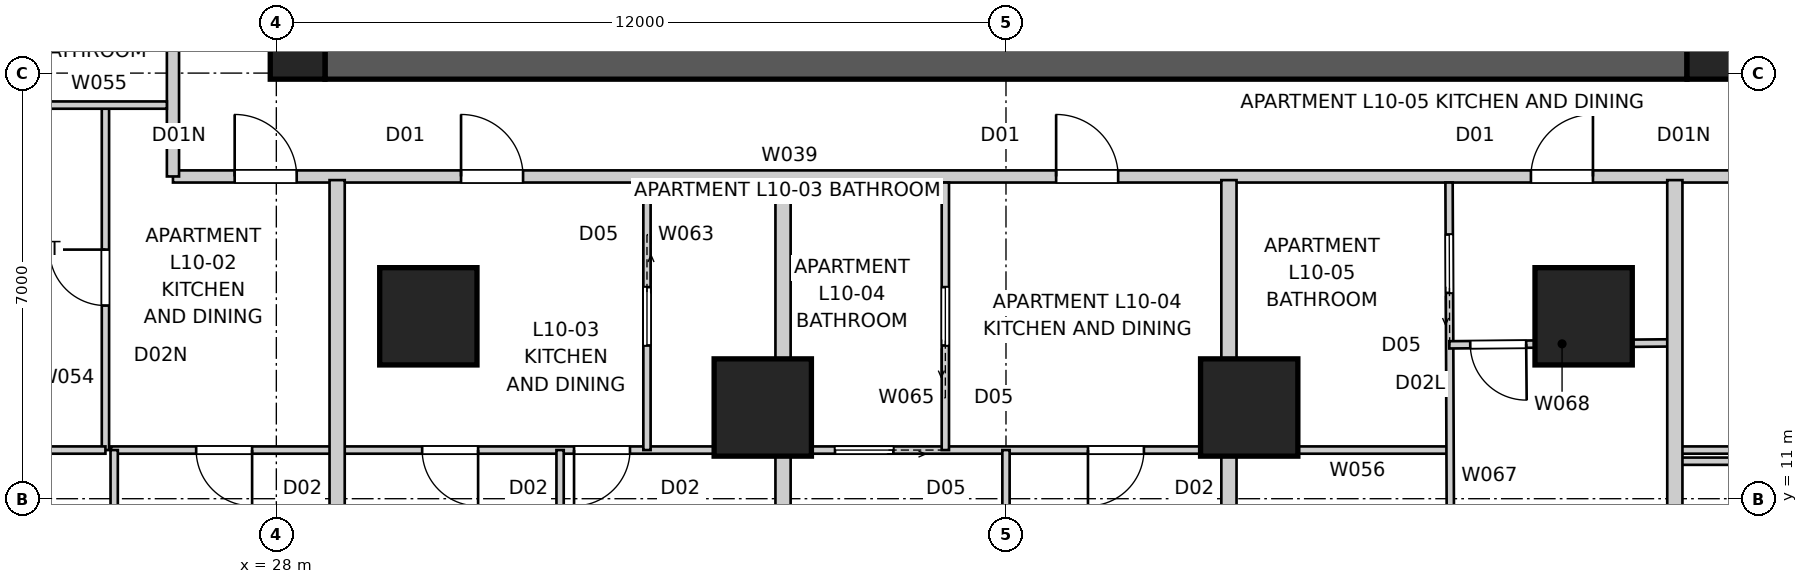
"""IFC4 building model, lengths in metres.
Left out: names, types, materials, properties, quantities, classifications, styles, units other than length and angle.
Written with IfcOpenShell. Run it as: python <this file> out.ifc"""

import sys

from ifc_helpers import new_model, si_unit, direction, frame, frame_2d, origin, origin_2d, place, context, subcontext, project, spatial, polyline, rectangle, outline, extrude, element, fill, save


model = new_model("IFC4")
c1 = context("Model", 3, precision=1e-05, world=origin(), true_north=direction((0.0, 1.0)))
c2 = subcontext(c1, "Body", "Model", "MODEL_VIEW")
j1 = project(units=[si_unit("LENGTHUNIT", "METRE"), si_unit("PLANEANGLEUNIT", "RADIAN")], contexts=[c1])
p1 = place(None, origin())
s1 = spatial("IfcSite", under=j1, at=p1, CompositionType="ELEMENT")
p2 = place(p1, origin())
s2 = spatial("IfcBuilding", under=s1, at=p2, CompositionType="ELEMENT")
p3 = place(p2, frame((0.0, 0.0, 38.8)))
s3 = spatial("IfcBuildingStorey", under=s2, at=p3, CompositionType="ELEMENT", Elevation=38.8)
p4 = place(p3, frame((51.2, 18.35, 0.0), z_axis=(0.0, 0.0, 1.0), x_axis=(-1.0, 0.0, 0.0)))
e1 = element("IfcWall", 1, at=p4, inside=s3, PredefinedType="SHEAR", context=c2, shape_type="SweptSolid", body=[
    extrude(outline(polyline([(0.0, -0.45), (22.4, -0.45), (22.4, -0.025), (22.85, -0.025), (22.85, 0.025), (22.4, 0.025), (22.4, 0.45), (0.0, 0.45), (0.0, 0.025), (-0.45, 0.025), (-0.45, -0.025), (0.0, -0.025), (0.0, -0.45)])), origin(), (0.0, 0.0, 1.0), 3.4),
])
p5 = place(p3, frame((51.65, 18.8, 0.0), z_axis=(0.0, 0.0, 1.0), x_axis=(0.0, 1.0, 0.0)))
e2 = element("IfcWall", 2, at=p5, inside=s3, PredefinedType="SHEAR", context=c2, shape_type="SweptSolid", body=[
    extrude(outline(polyline([(0.0, -0.45), (22.4, -0.45), (22.4, -0.025), (22.85, -0.025), (22.85, 0.025), (22.4, 0.025), (22.4, 0.45), (0.0, 0.45), (0.0, 0.025), (-0.45, 0.025), (-0.45, -0.025), (0.0, -0.025), (0.0, -0.45)])), origin(), (0.0, 0.0, 1.0), 3.4),
])
p6 = place(p5, frame((11.14, 0.0, 0.0)))
e3 = element("IfcOpeningElement", 3, at=p6, cuts=e2, PredefinedType="OPENING", context=c2, shape_type="SweptSolid", body=[
    extrude(rectangle(XDim=1.02, YDim=2.4, at=frame_2d((0.51, 1.2))), frame((0.0, 0.46, 0.0), z_axis=(0.0, -1.0, 0.0), x_axis=(1.0, 0.0, 0.0)), (0.0, 0.0, 1.0), 0.92),
])
p7 = place(p3, frame((28.35, 41.2, 0.0), z_axis=(0.0, 0.0, 1.0), x_axis=(0.0, -1.0, 0.0)))
e4 = element("IfcWall", 4, at=p7, inside=s3, PredefinedType="SHEAR", context=c2, shape_type="SweptSolid", body=[
    extrude(outline(polyline([(0.0, -0.45), (22.4, -0.45), (22.4, -0.025), (22.85, -0.025), (22.85, 0.025), (22.4, 0.025), (22.4, 0.45), (0.0, 0.45), (0.0, 0.025), (-0.45, 0.025), (-0.45, -0.025), (0.0, -0.025), (0.0, -0.45)])), origin(), (0.0, 0.0, 1.0), 3.4),
])
p8 = place(p7, frame((11.14, 0.0, 0.0)))
e5 = element("IfcOpeningElement", 5, at=p8, cuts=e4, PredefinedType="OPENING", context=c2, shape_type="SweptSolid", body=[
    extrude(rectangle(XDim=1.02, YDim=2.4, at=frame_2d((0.51, 1.2))), frame((0.0, 0.46, 0.0), z_axis=(0.0, -1.0, 0.0), x_axis=(1.0, 0.0, 0.0)), (0.0, 0.0, 1.0), 0.92),
])
for number, where, z_axis, x_axis in (
    (6, (28.35, 18.35, 0.0), (0.0, 0.0, 1.0), (1.0, 0.0, 0.0)),
    (7, (51.65, 18.35, 0.0), (0.0, 0.0, 1.0), (1.0, 0.0, 0.0)),
):
    element("IfcColumn", number, at=place(p3, frame(where, z_axis=z_axis, x_axis=x_axis)), inside=s3, PredefinedType="COLUMN", context=c2, shape_type="SweptSolid", body=[
        extrude(rectangle(XDim=0.9, YDim=0.9, at=origin_2d()), origin(), (0.0, 0.0, 1.0), 3.4),
    ])
for number, where, z_axis, x_axis in (
    (8, (30.5, 14.0, 0.0), (0.0, 0.0, 1.0), (1.0, 0.0, 0.0)),
    (9, (36.0, 12.5, 0.0), (0.0, 0.0, 1.0), (1.0, 0.0, 0.0)),
    (10, (44.0, 12.5, 0.0), (0.0, 0.0, 1.0), (1.0, 0.0, 0.0)),
    (11, (49.5, 14.0, 0.0), (0.0, 0.0, 1.0), (1.0, 0.0, 0.0)),
):
    element("IfcColumn", number, at=place(p3, frame(where, z_axis=z_axis, x_axis=x_axis)), inside=s3, PredefinedType="COLUMN", context=c2, shape_type="SweptSolid", body=[
        extrude(rectangle(XDim=1.6, YDim=1.6, at=origin_2d()), origin(), (0.0, 0.0, 1.0), 3.4),
    ])
p9 = place(p3, frame((26.3, 16.3, 0.0), z_axis=(0.0, 0.0, 1.0), x_axis=(1.0, 0.0, 0.0)))
e12 = element("IfcWall", 12, at=p9, inside=s3, PredefinedType="PARTITIONING", context=c2, shape_type="SweptSolid", body=[
    extrude(rectangle(XDim=28.2, YDim=0.2, at=frame_2d((14.1, 0.0))), origin(), (0.0, 0.0, 1.0), 3.2),
])
p10 = place(p9, frame((4.738, 0.0, 0.0)))
e13 = element("IfcOpeningElement", 13, at=p10, cuts=e12, PredefinedType="OPENING", context=c2, shape_type="SweptSolid", body=[
    extrude(rectangle(XDim=1.02, YDim=2.34, at=frame_2d((0.51, 1.17))), frame((0.0, 0.11, 0.0), z_axis=(0.0, -1.0, 0.0), x_axis=(1.0, 0.0, 0.0)), (0.0, 0.0, 1.0), 0.22),
])
p11 = place(p9, frame((14.525, 0.0, 0.0)))
e14 = element("IfcOpeningElement", 14, at=p11, cuts=e12, PredefinedType="OPENING", context=c2, shape_type="SweptSolid", body=[
    extrude(rectangle(XDim=1.02, YDim=2.34, at=frame_2d((0.51, 1.17))), frame((0.0, 0.11, 0.0), z_axis=(0.0, -1.0, 0.0), x_axis=(1.0, 0.0, 0.0)), (0.0, 0.0, 1.0), 0.22),
])
p12 = place(p9, frame((22.333, 0.0, 0.0)))
e15 = element("IfcOpeningElement", 15, at=p12, cuts=e12, PredefinedType="OPENING", context=c2, shape_type="SweptSolid", body=[
    extrude(rectangle(XDim=1.02, YDim=2.34, at=frame_2d((0.51, 1.17))), frame((0.0, 0.11, 0.0), z_axis=(0.0, -1.0, 0.0), x_axis=(1.0, 0.0, 0.0)), (0.0, 0.0, 1.0), 0.22),
])
p13 = place(p9, frame((25.765, 0.0, 0.0)))
e16 = element("IfcOpeningElement", 16, at=p13, cuts=e12, PredefinedType="OPENING", context=c2, shape_type="SweptSolid", body=[
    extrude(rectangle(XDim=1.02, YDim=2.0, at=frame_2d((0.51, 1.0))), frame((0.0, 0.11, 0.0), z_axis=(0.0, -1.0, 0.0), x_axis=(1.0, 0.0, 0.0)), (0.0, 0.0, 1.0), 0.22),
])
p14 = place(p9, frame((1.015, 0.0, 0.0)))
e17 = element("IfcOpeningElement", 17, at=p14, cuts=e12, PredefinedType="OPENING", context=c2, shape_type="SweptSolid", body=[
    extrude(rectangle(XDim=1.02, YDim=2.0, at=frame_2d((0.51, 1.0))), frame((0.0, 0.11, 0.0), z_axis=(0.0, -1.0, 0.0), x_axis=(1.0, 0.0, 0.0)), (0.0, 0.0, 1.0), 0.22),
])
p15 = place(p3, frame((26.3, 44.5, 0.0), z_axis=(0.0, 0.0, 1.0), x_axis=(0.0, -1.0, 0.0)))
e18 = element("IfcWall", 18, at=p15, inside=s3, PredefinedType="PARTITIONING", context=c2, shape_type="SweptSolid", body=[
    extrude(rectangle(XDim=28.2, YDim=0.2, at=frame_2d((14.1, 0.0))), origin(), (0.0, 0.0, 1.0), 3.2),
])
p16 = place(p15, frame((11.826, 0.0, 0.0)))
e19 = element("IfcOpeningElement", 19, at=p16, cuts=e18, PredefinedType="OPENING", context=c2, shape_type="SweptSolid", body=[
    extrude(rectangle(XDim=1.02, YDim=2.34, at=frame_2d((0.51, 1.17))), frame((0.0, 0.11, 0.0), z_axis=(0.0, -1.0, 0.0), x_axis=(1.0, 0.0, 0.0)), (0.0, 0.0, 1.0), 0.22),
])
p17 = place(p15, frame((16.048, 0.0, 0.0)))
e20 = element("IfcOpeningElement", 20, at=p17, cuts=e18, PredefinedType="OPENING", context=c2, shape_type="SweptSolid", body=[
    extrude(rectangle(XDim=1.02, YDim=2.34, at=frame_2d((0.51, 1.17))), frame((0.0, 0.11, 0.0), z_axis=(0.0, -1.0, 0.0), x_axis=(1.0, 0.0, 0.0)), (0.0, 0.0, 1.0), 0.22),
])
p18 = place(p15, frame((1.415, 0.0, 0.0)))
e21 = element("IfcOpeningElement", 21, at=p18, cuts=e18, PredefinedType="OPENING", context=c2, shape_type="SweptSolid", body=[
    extrude(rectangle(XDim=1.02, YDim=2.0, at=frame_2d((0.51, 1.0))), frame((0.0, 0.11, 0.0), z_axis=(0.0, -1.0, 0.0), x_axis=(1.0, 0.0, 0.0)), (0.0, 0.0, 1.0), 0.22),
])
for number, where, z_axis, x_axis in (
    (22, (29.0, 4.0, 0.0), (0.0, 0.0, 1.0), (0.0, 1.0, 0.0)),
    (23, (36.333, 4.0, 0.0), (0.0, 0.0, 1.0), (0.0, 1.0, 0.0)),
    (24, (43.667, 4.0, 0.0), (0.0, 0.0, 1.0), (0.0, 1.0, 0.0)),
    (25, (51.0, 4.0, 0.0), (0.0, 0.0, 1.0), (0.0, 1.0, 0.0)),
):
    element("IfcWall", number, at=place(p3, frame(where, z_axis=z_axis, x_axis=x_axis)), inside=s3, PredefinedType="PARTITIONING", context=c2, shape_type="SweptSolid", body=[
        extrude(rectangle(XDim=12.24, YDim=0.25, at=frame_2d((6.12, 0.0))), origin(), (0.0, 0.0, 1.0), 3.2),
    ])
p19 = place(p3, frame((25.189, 11.8, 0.0), z_axis=(0.0, 0.0, 1.0), x_axis=(0.0, 1.0, 0.0)))
e26 = element("IfcWall", 26, at=p19, inside=s3, PredefinedType="PARTITIONING", context=c2, shape_type="SweptSolid", body=[
    extrude(rectangle(XDim=5.674, YDim=0.12, at=frame_2d((2.837, 0.0))), origin(), (0.0, 0.0, 1.0), 3.2),
])
p20 = place(p19, frame((2.377, 0.0, 0.0)))
e27 = element("IfcOpeningElement", 27, at=p20, cuts=e26, PredefinedType="OPENING", context=c2, shape_type="SweptSolid", body=[
    extrude(rectangle(XDim=0.92, YDim=2.0, at=frame_2d((0.46, 1.0))), frame((0.0, 0.07, 0.0), z_axis=(0.0, -1.0, 0.0), x_axis=(1.0, 0.0, 0.0)), (0.0, 0.0, 1.0), 0.14),
])
p21 = place(p3, frame((21.8, 17.474, 0.0), z_axis=(0.0, 0.0, 1.0), x_axis=(1.0, 0.0, 0.0)))
e28 = element("IfcWall", 28, at=p21, inside=s3, PredefinedType="PARTITIONING", context=c2, shape_type="SweptSolid", body=[
    extrude(rectangle(XDim=4.4, YDim=0.12, at=frame_2d((2.2, 0.0))), origin(), (0.0, 0.0, 1.0), 3.2),
])
p22 = place(p21, frame((1.215, 0.0, 0.0)))
e29 = element("IfcOpeningElement", 29, at=p22, cuts=e28, PredefinedType="OPENING", context=c2, shape_type="SweptSolid", body=[
    extrude(rectangle(XDim=0.96, YDim=2.1, at=frame_2d((0.48, 1.05))), frame((0.0, 0.07, 0.0), z_axis=(0.0, -1.0, 0.0), x_axis=(1.0, 0.0, 0.0)), (0.0, 0.0, 1.0), 0.14),
])
p23 = place(p3, frame((47.287, 11.8, 0.0), z_axis=(0.0, 0.0, 1.0), x_axis=(-1.0, 0.0, 0.0)))
e30 = element("IfcWall", 30, at=p23, inside=s3, PredefinedType="PARTITIONING", context=c2, shape_type="SweptSolid", body=[
    extrude(rectangle(XDim=22.003, YDim=0.12, at=frame_2d((11.002, 0.0))), origin(), (0.0, 0.0, 1.0), 3.2),
])
p24 = place(p23, frame((15.968, 0.0, 0.0)))
e31 = element("IfcOpeningElement", 31, at=p24, cuts=e30, PredefinedType="OPENING", context=c2, shape_type="SweptSolid", body=[
    extrude(rectangle(XDim=0.92, YDim=2.34, at=frame_2d((0.46, 1.17))), frame((0.0, 0.07, 0.0), z_axis=(0.0, -1.0, 0.0), x_axis=(1.0, 0.0, 0.0)), (0.0, 0.0, 1.0), 0.14),
])
p25 = place(p23, frame((13.47, 0.0, 0.0)))
e32 = element("IfcOpeningElement", 32, at=p25, cuts=e30, PredefinedType="OPENING", context=c2, shape_type="SweptSolid", body=[
    extrude(rectangle(XDim=0.92, YDim=2.34, at=frame_2d((0.46, 1.17))), frame((0.0, 0.07, 0.0), z_axis=(0.0, -1.0, 0.0), x_axis=(1.0, 0.0, 0.0)), (0.0, 0.0, 1.0), 0.14),
])
p26 = place(p23, frame((5.018, 0.0, 0.0)))
e33 = element("IfcOpeningElement", 33, at=p26, cuts=e30, PredefinedType="OPENING", context=c2, shape_type="SweptSolid", body=[
    extrude(rectangle(XDim=0.92, YDim=2.34, at=frame_2d((0.46, 1.17))), frame((0.0, 0.07, 0.0), z_axis=(0.0, -1.0, 0.0), x_axis=(1.0, 0.0, 0.0)), (0.0, 0.0, 1.0), 0.14),
])
p27 = place(p23, frame((19.685, 0.0, 0.0)))
e34 = element("IfcOpeningElement", 34, at=p27, cuts=e30, PredefinedType="OPENING", context=c2, shape_type="SweptSolid", body=[
    extrude(rectangle(XDim=0.92, YDim=2.34, at=frame_2d((0.46, 1.17))), frame((0.0, 0.07, 0.0), z_axis=(0.0, -1.0, 0.0), x_axis=(1.0, 0.0, 0.0)), (0.0, 0.0, 1.0), 0.14),
])
p28 = place(p23, frame((9.138, 0.0, 0.0)))
e35 = element("IfcOpeningElement", 35, at=p28, cuts=e30, PredefinedType="OPENING", context=c2, shape_type="SweptSolid", body=[
    extrude(rectangle(XDim=0.96, YDim=2.1, at=frame_2d((0.48, 1.05))), frame((0.0, 0.07, 0.0), z_axis=(0.0, -1.0, 0.0), x_axis=(1.0, 0.0, 0.0)), (0.0, 0.0, 1.0), 0.14),
])
p29 = place(p3, frame((25.189, 11.8, 0.0), z_axis=(0.0, 0.0, 1.0), x_axis=(-1.0, 0.0, 0.0)))
e36 = element("IfcWall", 36, at=p29, inside=s3, PredefinedType="PARTITIONING", context=c2, shape_type="SweptSolid", body=[
    extrude(rectangle(XDim=3.389, YDim=0.12, at=frame_2d((1.695, 0.0))), origin(), (0.0, 0.0, 1.0), 3.2),
])
p30 = place(p3, frame((25.333, 11.8, 0.0), z_axis=(0.0, 0.0, 1.0), x_axis=(0.0, -1.0, 0.0)))
e37 = element("IfcWall", 37, at=p30, inside=s3, PredefinedType="PARTITIONING", context=c2, shape_type="SweptSolid", body=[
    extrude(rectangle(XDim=7.76, YDim=0.12, at=frame_2d((3.88, 0.0))), origin(), (0.0, 0.0, 1.0), 2.4),
])
p31 = place(p3, frame((34.096, 16.2, 0.0), z_axis=(0.0, 0.0, 1.0), x_axis=(0.0, -1.0, 0.0)))
e38 = element("IfcWall", 38, at=p31, inside=s3, PredefinedType="PARTITIONING", context=c2, shape_type="SweptSolid", body=[
    extrude(rectangle(XDim=4.4, YDim=0.12, at=frame_2d((2.2, 0.0))), origin(), (0.0, 0.0, 1.0), 2.671),
])
p32 = place(p31, frame((1.72, 0.0, 0.0)))
e39 = element("IfcOpeningElement", 39, at=p32, cuts=e38, PredefinedType="OPENING", context=c2, shape_type="SweptSolid", body=[
    extrude(rectangle(XDim=0.96, YDim=2.1, at=frame_2d((0.48, 1.05))), frame((0.0, 0.07, 0.0), z_axis=(0.0, -1.0, 0.0), x_axis=(1.0, 0.0, 0.0)), (0.0, 0.0, 1.0), 0.14),
])
p33 = place(p3, frame((32.667, 11.8, 0.0), z_axis=(0.0, 0.0, 1.0), x_axis=(0.0, -1.0, 0.0)))
e40 = element("IfcWall", 40, at=p33, inside=s3, PredefinedType="PARTITIONING", context=c2, shape_type="SweptSolid", body=[
    extrude(rectangle(XDim=7.76, YDim=0.12, at=frame_2d((3.88, 0.0))), origin(), (0.0, 0.0, 1.0), 3.2),
])
p34 = place(p3, frame((39.003, 11.8, 0.0), z_axis=(0.0, 0.0, 1.0), x_axis=(0.0, 1.0, 0.0)))
e41 = element("IfcWall", 41, at=p34, inside=s3, PredefinedType="PARTITIONING", context=c2, shape_type="SweptSolid", body=[
    extrude(rectangle(XDim=4.4, YDim=0.12, at=frame_2d((2.2, 0.0))), origin(), (0.0, 0.0, 1.0), 3.2),
])
p35 = place(p34, frame((1.72, 0.0, 0.0)))
e42 = element("IfcOpeningElement", 42, at=p35, cuts=e41, PredefinedType="OPENING", context=c2, shape_type="SweptSolid", body=[
    extrude(rectangle(XDim=0.96, YDim=2.1, at=frame_2d((0.48, 1.05))), frame((0.0, 0.07, 0.0), z_axis=(0.0, -1.0, 0.0), x_axis=(1.0, 0.0, 0.0)), (0.0, 0.0, 1.0), 0.14),
])
p36 = place(p3, frame((40.0, 11.8, 0.0), z_axis=(0.0, 0.0, 1.0), x_axis=(0.0, -1.0, 0.0)))
e43 = element("IfcWall", 43, at=p36, inside=s3, PredefinedType="PARTITIONING", context=c2, shape_type="SweptSolid", body=[
    extrude(rectangle(XDim=7.76, YDim=0.12, at=frame_2d((3.88, 0.0))), origin(), (0.0, 0.0, 1.0), 3.2),
])
p37 = place(p3, frame((47.333, 4.04, 0.0), z_axis=(0.0, 0.0, 1.0), x_axis=(-0.003834774141, 0.999992647227, 0.0)))
e44 = element("IfcWall", 44, at=p37, inside=s3, PredefinedType="PARTITIONING", context=c2, shape_type="SweptSolid", body=[
    extrude(rectangle(XDim=12.16, YDim=0.12, at=frame_2d((6.08, 0.0))), origin(), (0.0, 0.0, 1.0), 3.2),
])
p38 = place(p37, frame((10.345, 0.0, 0.0)))
e45 = element("IfcOpeningElement", 45, at=p38, cuts=e44, PredefinedType="OPENING", context=c2, shape_type="SweptSolid", body=[
    extrude(rectangle(XDim=0.96, YDim=2.1, at=frame_2d((0.48, 1.05))), frame((0.0, 0.07, 0.0), z_axis=(0.0, -1.0, 0.0), x_axis=(1.0, 0.0, 0.0)), (0.0, 0.0, 1.0), 0.14),
])
p39 = place(p37, frame((3.4, 0.0, 0.0)))
e46 = element("IfcOpeningElement", 46, at=p39, cuts=e44, PredefinedType="OPENING", context=c2, shape_type="SweptSolid", body=[
    extrude(rectangle(XDim=0.92, YDim=2.34, at=frame_2d((0.46, 1.17))), frame((0.0, 0.07, 0.0), z_axis=(0.0, -1.0, 0.0), x_axis=(1.0, 0.0, 0.0)), (0.0, 0.0, 1.0), 0.14),
])
p40 = place(p3, frame((51.0, 13.563, 0.0), z_axis=(0.0, 0.0, 1.0), x_axis=(-0.9999611125, -0.008818927805, 0.0)))
e47 = element("IfcWall", 47, at=p40, inside=s3, PredefinedType="PARTITIONING", context=c2, shape_type="SweptSolid", body=[
    extrude(rectangle(XDim=3.71, YDim=0.12, at=frame_2d((1.855, 0.0))), origin(), (0.0, 0.0, 1.0), 2.2),
])
p41 = place(p40, frame((2.445, 0.0, 0.0)))
e48 = element("IfcOpeningElement", 48, at=p41, cuts=e47, PredefinedType="OPENING", context=c2, shape_type="SweptSolid", body=[
    extrude(rectangle(XDim=0.92, YDim=2.1, at=frame_2d((0.46, 1.05))), frame((0.0, 0.07, 0.0), z_axis=(0.0, -1.0, 0.0), x_axis=(1.0, 0.0, 0.0)), (0.0, 0.0, 1.0), 0.14),
])
p42 = place(p3, frame((58.2, 11.8, 0.0), z_axis=(0.0, 0.0, 1.0), x_axis=(-1.0, 0.0, 0.0)))
e49 = element("IfcWall", 49, at=p42, inside=s3, PredefinedType="PARTITIONING", context=c2, shape_type="SweptSolid", body=[
    extrude(rectangle(XDim=7.2, YDim=0.12, at=frame_2d((3.6, 0.0))), origin(), (0.0, 0.0, 1.0), 3.2),
])
p43 = place(p3, frame((58.333, 11.617, 0.0), z_axis=(0.0, 0.0, 1.0), x_axis=(-1.0, 0.0, 0.0)))
e50 = element("IfcWall", 50, at=p43, inside=s3, PredefinedType="PARTITIONING", context=c2, shape_type="SweptSolid", body=[
    extrude(rectangle(XDim=7.333, YDim=0.12, at=frame_2d((3.667, 0.0))), origin(), (0.0, 0.0, 1.0), 3.2),
])
p44 = place(p10, origin())
e51 = element("IfcDoor", 51, at=p44, inside=s3, OperationType="SINGLE_SWING_LEFT", PredefinedType="DOOR", context=c2, shape_type="SweptSolid", body=[
    extrude(rectangle(XDim=1.02, YDim=2.34, at=frame_2d((0.51, 1.17))), frame((0.0, 0.025, 0.0), z_axis=(0.0, -1.0, 0.0), x_axis=(1.0, 0.0, 0.0)), (0.0, 0.0, 1.0), 0.05),
])
fill(e13, e51)
p45 = place(p11, origin())
e52 = element("IfcDoor", 52, at=p45, inside=s3, OperationType="SINGLE_SWING_LEFT", PredefinedType="DOOR", context=c2, shape_type="SweptSolid", body=[
    extrude(rectangle(XDim=1.02, YDim=2.34, at=frame_2d((0.51, 1.17))), frame((0.0, 0.025, 0.0), z_axis=(0.0, -1.0, 0.0), x_axis=(1.0, 0.0, 0.0)), (0.0, 0.0, 1.0), 0.05),
])
fill(e14, e52)
p46 = place(p12, origin())
e53 = element("IfcDoor", 53, at=p46, inside=s3, OperationType="SINGLE_SWING_RIGHT", PredefinedType="DOOR", context=c2, shape_type="SweptSolid", body=[
    extrude(rectangle(XDim=1.02, YDim=2.34, at=frame_2d((0.51, 1.17))), frame((0.0, 0.025, 0.0), z_axis=(0.0, -1.0, 0.0), x_axis=(1.0, 0.0, 0.0)), (0.0, 0.0, 1.0), 0.05),
])
fill(e15, e53)
p47 = place(p14, origin())
e54 = element("IfcDoor", 54, at=p47, inside=s3, OperationType="SINGLE_SWING_LEFT", PredefinedType="DOOR", context=c2, shape_type="SweptSolid", body=[
    extrude(rectangle(XDim=1.02, YDim=2.0, at=frame_2d((0.51, 1.0))), frame((0.0, 0.025, 0.0), z_axis=(0.0, -1.0, 0.0), x_axis=(1.0, 0.0, 0.0)), (0.0, 0.0, 1.0), 0.05),
])
fill(e17, e54)
p48 = place(p32, origin())
e55 = element("IfcDoor", 55, at=p48, inside=s3, OperationType="SLIDING_TO_LEFT", PredefinedType="DOOR", context=c2, shape_type="SweptSolid", body=[
    extrude(rectangle(XDim=0.96, YDim=2.1, at=frame_2d((0.48, 1.05))), frame((0.0, 0.025, 0.0), z_axis=(0.0, -1.0, 0.0), x_axis=(1.0, 0.0, 0.0)), (0.0, 0.0, 1.0), 0.05),
])
fill(e39, e55)
p49 = place(p24, origin())
e56 = element("IfcDoor", 56, at=p49, inside=s3, OperationType="SINGLE_SWING_LEFT", PredefinedType="DOOR", context=c2, shape_type="SweptSolid", body=[
    extrude(rectangle(XDim=0.92, YDim=2.34, at=frame_2d((0.46, 1.17))), frame((0.0, 0.025, 0.0), z_axis=(0.0, -1.0, 0.0), x_axis=(1.0, 0.0, 0.0)), (0.0, 0.0, 1.0), 0.05),
])
fill(e31, e56)
p50 = place(p25, origin())
e57 = element("IfcDoor", 57, at=p50, inside=s3, OperationType="SINGLE_SWING_RIGHT", PredefinedType="DOOR", context=c2, shape_type="SweptSolid", body=[
    extrude(rectangle(XDim=0.92, YDim=2.34, at=frame_2d((0.46, 1.17))), frame((0.0, 0.025, 0.0), z_axis=(0.0, -1.0, 0.0), x_axis=(1.0, 0.0, 0.0)), (0.0, 0.0, 1.0), 0.05),
])
fill(e32, e57)
p51 = place(p35, origin())
e58 = element("IfcDoor", 58, at=p51, inside=s3, OperationType="SLIDING_TO_LEFT", PredefinedType="DOOR", context=c2, shape_type="SweptSolid", body=[
    extrude(rectangle(XDim=0.96, YDim=2.1, at=frame_2d((0.48, 1.05))), frame((0.0, 0.025, 0.0), z_axis=(0.0, -1.0, 0.0), x_axis=(1.0, 0.0, 0.0)), (0.0, 0.0, 1.0), 0.05),
])
fill(e42, e58)
p52 = place(p26, origin())
e59 = element("IfcDoor", 59, at=p52, inside=s3, OperationType="SINGLE_SWING_RIGHT", PredefinedType="DOOR", context=c2, shape_type="SweptSolid", body=[
    extrude(rectangle(XDim=0.92, YDim=2.34, at=frame_2d((0.46, 1.17))), frame((0.0, 0.025, 0.0), z_axis=(0.0, -1.0, 0.0), x_axis=(1.0, 0.0, 0.0)), (0.0, 0.0, 1.0), 0.05),
])
fill(e33, e59)
p53 = place(p41, origin())
e60 = element("IfcDoor", 60, at=p53, inside=s3, OperationType="SINGLE_SWING_LEFT", PredefinedType="DOOR", context=c2, shape_type="SweptSolid", body=[
    extrude(rectangle(XDim=0.92, YDim=2.1, at=frame_2d((0.46, 1.05))), frame((0.0, 0.025, 0.0), z_axis=(0.0, -1.0, 0.0), x_axis=(1.0, 0.0, 0.0)), (0.0, 0.0, 1.0), 0.05),
])
fill(e48, e60)
p54 = place(p38, origin())
e61 = element("IfcDoor", 61, at=p54, inside=s3, OperationType="SLIDING_TO_LEFT", PredefinedType="DOOR", context=c2, shape_type="SweptSolid", body=[
    extrude(rectangle(XDim=0.96, YDim=2.1, at=frame_2d((0.48, 1.05))), frame((0.0, 0.025, 0.0), z_axis=(0.0, -1.0, 0.0), x_axis=(1.0, 0.0, 0.0)), (0.0, 0.0, 1.0), 0.05),
])
fill(e45, e61)
p55 = place(p20, origin())
e62 = element("IfcDoor", 62, at=p55, inside=s3, OperationType="SINGLE_SWING_RIGHT", PredefinedType="DOOR", context=c2, shape_type="SweptSolid", body=[
    extrude(rectangle(XDim=0.92, YDim=2.0, at=frame_2d((0.46, 1.0))), frame((0.0, 0.025, 0.0), z_axis=(0.0, -1.0, 0.0), x_axis=(1.0, 0.0, 0.0)), (0.0, 0.0, 1.0), 0.05),
])
fill(e27, e62)
p56 = place(p27, origin())
e63 = element("IfcDoor", 63, at=p56, inside=s3, OperationType="SINGLE_SWING_LEFT", PredefinedType="DOOR", context=c2, shape_type="SweptSolid", body=[
    extrude(rectangle(XDim=0.92, YDim=2.34, at=frame_2d((0.46, 1.17))), frame((0.0, 0.025, 0.0), z_axis=(0.0, -1.0, 0.0), x_axis=(1.0, 0.0, 0.0)), (0.0, 0.0, 1.0), 0.05),
])
fill(e34, e63)
p57 = place(p28, origin())
e64 = element("IfcDoor", 64, at=p57, inside=s3, OperationType="SLIDING_TO_LEFT", PredefinedType="DOOR", context=c2, shape_type="SweptSolid", body=[
    extrude(rectangle(XDim=0.96, YDim=2.1, at=frame_2d((0.48, 1.05))), frame((0.0, 0.025, 0.0), z_axis=(0.0, -1.0, 0.0), x_axis=(1.0, 0.0, 0.0)), (0.0, 0.0, 1.0), 0.05),
])
fill(e35, e64)
save(model, sys.argv[1])
